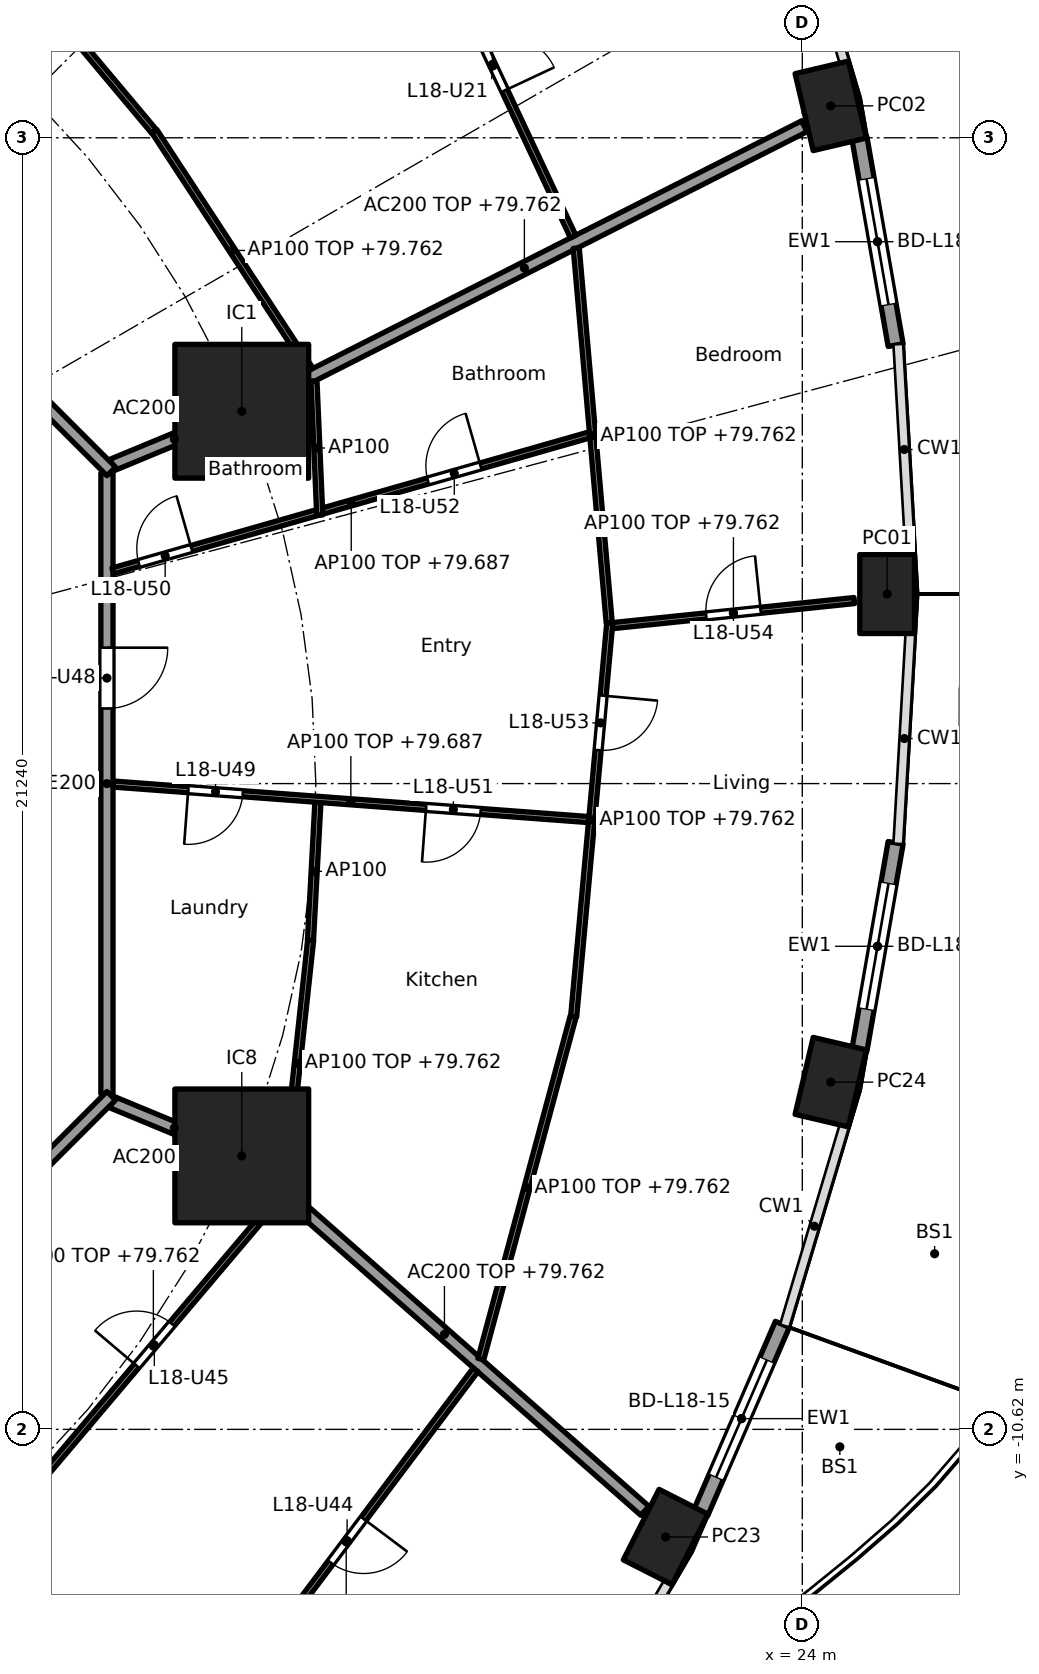
"""IFC4 building model, lengths in metres.
Left out: names, types, materials, properties, quantities, classifications, styles, units other than length and angle.
Written with IfcOpenShell. Run it as: python <this file> out.ifc"""

import sys

from ifc_helpers import new_model, si_unit, direction, frame, frame_2d, origin, origin_2d, place, context, subcontext, project, spatial, rectangle, hollow_rectangle, extrude, element, fill, save


model = new_model("IFC4")
c1 = context("Model", 3, precision=1e-05, world=origin(), true_north=direction((0.0, 1.0)))
c2 = subcontext(c1, "Body", "Model", "MODEL_VIEW")
j1 = project(units=[si_unit("LENGTHUNIT", "METRE"), si_unit("PLANEANGLEUNIT", "RADIAN")], contexts=[c1])
p1 = place(None, origin())
s1 = spatial("IfcSite", under=j1, at=p1, CompositionType="ELEMENT")
p2 = place(p1, origin())
s2 = spatial("IfcBuilding", under=s1, at=p2, CompositionType="ELEMENT")
p3 = place(p2, frame((0.0, 0.0, 77.0)))
s3 = spatial("IfcBuildingStorey", under=s2, at=p3, CompositionType="ELEMENT", Elevation=77.0)
for number, where, z_axis, x_axis in (
    (1, (25.395, 3.118, 0.0), (0.0, 0.0, 1.0), (0.0, 1.0, 0.0)),
    (2, (24.468, 11.145, 0.0), (0.0, 0.0, 1.0), (-0.229, 0.973, 0.0)),
    (3, (21.751, -12.39, 0.0), (0.0, 0.0, 1.0), (0.452, 0.892, 0.0)),
    (4, (24.468, -4.91, 0.0), (0.0, 0.0, 1.0), (0.229, 0.973, 0.0)),
):
    element("IfcColumn", number, at=place(p3, frame(where, z_axis=z_axis, x_axis=x_axis)), inside=s3, PredefinedType="COLUMN", context=c2, shape_type="SweptSolid", body=[
        extrude(hollow_rectangle(XDim=1.3, YDim=0.9, WallThickness=0.045, at=origin_2d()), origin(), (0.0, 0.0, 1.0), 3.7),
    ])
for number, where, z_axis, x_axis in (
    (5, (14.782, 6.123, 0.0), (0.0, 0.0, 1.0), (1.0, 0.0, 0.0)),
    (6, (14.782, -6.123, 0.0), (0.0, 0.0, 1.0), (1.0, 0.0, 0.0)),
):
    element("IfcColumn", number, at=place(p3, frame(where, z_axis=z_axis, x_axis=x_axis)), inside=s3, PredefinedType="COLUMN", context=c2, shape_type="SweptSolid", body=[
        extrude(rectangle(XDim=2.2, YDim=2.2, at=origin_2d()), origin(), (0.0, 0.0, 1.0), 3.7),
    ])
p4 = place(p3, frame((24.94, 10.613, 0.0), z_axis=(0.0, 0.0, 1.0), x_axis=(0.172164316671, -0.985068245385, 0.0)))
e7 = element("IfcWall", 7, at=p4, inside=s3, PredefinedType="SOLIDWALL", context=c2, shape_type="SweptSolid", body=[
    extrude(rectangle(XDim=3.454, YDim=0.25, at=frame_2d((1.727, 0.0))), origin(), (0.0, 0.0, 1.0), 3.44),
])
p5 = place(p4, frame((0.677, 0.0, 0.0)))
e8 = element("IfcOpeningElement", 8, at=p5, cuts=e7, PredefinedType="OPENING", context=c2, shape_type="SweptSolid", body=[
    extrude(rectangle(XDim=2.1, YDim=2.4, at=frame_2d((1.05, 1.2))), frame((0.0, 0.135, 0.0), z_axis=(0.0, -1.0, 0.0), x_axis=(1.0, 0.0, 0.0)), (0.0, 0.0, 1.0), 0.27),
])
p6 = place(p3, frame((23.672, -8.893, 0.0), z_axis=(0.0, 0.0, 1.0), x_axis=(-0.397621629246, -0.917549475481, 0.0)))
e9 = element("IfcWall", 9, at=p6, inside=s3, PredefinedType="SOLIDWALL", context=c2, shape_type="SweptSolid", body=[
    extrude(rectangle(XDim=3.379, YDim=0.25, at=frame_2d((1.69, 0.0))), origin(), (0.0, 0.0, 1.0), 3.44),
])
p7 = place(p6, frame((0.64, 0.0, 0.0)))
e10 = element("IfcOpeningElement", 10, at=p7, cuts=e9, PredefinedType="OPENING", context=c2, shape_type="SweptSolid", body=[
    extrude(rectangle(XDim=2.1, YDim=2.4, at=frame_2d((1.05, 1.2))), frame((0.0, 0.135, 0.0), z_axis=(0.0, -1.0, 0.0), x_axis=(1.0, 0.0, 0.0)), (0.0, 0.0, 1.0), 0.27),
])
p8 = place(p3, frame((25.535, -0.974, 0.0), z_axis=(0.0, 0.0, 1.0), x_axis=(-0.172164316671, -0.985068245385, 0.0)))
e11 = element("IfcWall", 11, at=p8, inside=s3, PredefinedType="SOLIDWALL", context=c2, shape_type="SweptSolid", body=[
    extrude(rectangle(XDim=3.454, YDim=0.25, at=frame_2d((1.727, 0.0))), origin(), (0.0, 0.0, 1.0), 3.44),
])
p9 = place(p8, frame((0.677, 0.0, 0.0)))
e12 = element("IfcOpeningElement", 12, at=p9, cuts=e11, PredefinedType="OPENING", context=c2, shape_type="SweptSolid", body=[
    extrude(rectangle(XDim=2.1, YDim=2.4, at=frame_2d((1.05, 1.2))), frame((0.0, 0.135, 0.0), z_axis=(0.0, -1.0, 0.0), x_axis=(1.0, 0.0, 0.0)), (0.0, 0.0, 1.0), 0.27),
])
p10 = place(p3, frame((12.657, 5.243, 0.0), z_axis=(0.0, 0.0, 1.0), x_axis=(0.923876145736, 0.382691608661, 0.0)))
e13 = element("IfcWall", 13, at=p10, inside=s3, PredefinedType="PARTITIONING", context=c2, shape_type="SweptSolid", body=[
    extrude(rectangle(XDim=2.2, YDim=0.2, at=frame_2d((1.1, 0.0))), origin(), (0.0, 0.0, 1.0), 3.44),
])
p11 = place(p3, frame((14.827, 6.146, 0.0), z_axis=(0.0, 0.0, 1.0), x_axis=(0.892068075337, 0.451901038906, 0.0)))
e14 = element("IfcWall", 14, at=p11, inside=s3, PredefinedType="PARTITIONING", context=c2, shape_type="SweptSolid", body=[
    extrude(rectangle(XDim=10.32, YDim=0.2, at=frame_2d((5.16, 0.0))), origin(), (0.0, 0.0, 1.0), 2.762),
])
p12 = place(p3, frame((12.657, -5.243, 0.0), z_axis=(0.0, 0.0, 1.0), x_axis=(0.923876145736, -0.382691608661, 0.0)))
e15 = element("IfcWall", 15, at=p12, inside=s3, PredefinedType="PARTITIONING", context=c2, shape_type="SweptSolid", body=[
    extrude(rectangle(XDim=2.2, YDim=0.2, at=frame_2d((1.1, 0.0))), origin(), (0.0, 0.0, 1.0), 3.44),
])
p13 = place(p3, frame((14.82, -6.156, 0.0), z_axis=(0.0, 0.0, 1.0), x_axis=(0.750582231659, -0.660777052808, 0.0)))
e16 = element("IfcWall", 16, at=p13, inside=s3, PredefinedType="PARTITIONING", context=c2, shape_type="SweptSolid", body=[
    extrude(rectangle(XDim=8.781, YDim=0.2, at=frame_2d((4.391, 0.0))), origin(), (0.0, 0.0, 1.0), 2.762),
])
p14 = place(p3, frame((12.565, -5.104, 0.0), z_axis=(0.0, 0.0, 1.0), x_axis=(0.0, 1.0, 0.0)))
e17 = element("IfcWall", 17, at=p14, inside=s3, PredefinedType="PARTITIONING", context=c2, shape_type="SweptSolid", body=[
    extrude(rectangle(XDim=10.209, YDim=0.2, at=frame_2d((5.104, 0.0))), origin(), (0.0, 0.0, 1.0), 3.44),
])
p15 = place(p14, frame((6.339, 0.0, 0.0)))
e18 = element("IfcOpeningElement", 18, at=p15, cuts=e17, PredefinedType="OPENING", context=c2, shape_type="SweptSolid", body=[
    extrude(rectangle(XDim=1.0, YDim=2.1, at=frame_2d((0.5, 1.05))), frame((0.0, 0.11, 0.0), z_axis=(0.0, -1.0, 0.0), x_axis=(1.0, 0.0, 0.0)), (0.0, 0.0, 1.0), 0.22),
])
p16 = place(p3, frame((12.635, 5.134, 0.0), z_axis=(0.0, 0.0, 1.0), x_axis=(-0.707106781187, 0.707106781187, 0.0)))
e19 = element("IfcWall", 19, at=p16, inside=s3, PredefinedType="PARTITIONING", context=c2, shape_type="SweptSolid", body=[
    extrude(rectangle(XDim=10.609, YDim=0.2, at=frame_2d((5.305, 0.0))), origin(), (0.0, 0.0, 1.0), 3.44),
])
p17 = place(p3, frame((5.275, -12.494, 0.0), z_axis=(0.0, 0.0, 1.0), x_axis=(0.707106781187, 0.707106781187, 0.0)))
e20 = element("IfcWall", 20, at=p17, inside=s3, PredefinedType="PARTITIONING", context=c2, shape_type="SweptSolid", body=[
    extrude(rectangle(XDim=10.409, YDim=0.2, at=frame_2d((5.205, 0.0))), origin(), (0.0, 0.0, 1.0), 3.44),
])
p18 = place(p3, frame((20.879, 2.597, 0.0), z_axis=(0.0, 0.0, 1.0), x_axis=(0.994666546694, 0.103142914868, 0.0)))
e21 = element("IfcWall", 21, at=p18, inside=s3, PredefinedType="PARTITIONING", context=c2, shape_type="SweptSolid", body=[
    extrude(rectangle(XDim=3.998, YDim=0.1, at=frame_2d((1.999, 0.0))), origin(), (0.0, 0.0, 1.0), 2.762),
])
p19 = place(p18, frame((1.549, 0.0, 0.0)))
e22 = element("IfcOpeningElement", 22, at=p19, cuts=e21, PredefinedType="OPENING", context=c2, shape_type="SweptSolid", body=[
    extrude(rectangle(XDim=0.9, YDim=2.1, at=frame_2d((0.45, 1.05))), frame((0.0, 0.06, 0.0), z_axis=(0.0, -1.0, 0.0), x_axis=(1.0, 0.0, 0.0)), (0.0, 0.0, 1.0), 0.12),
])
p20 = place(p3, frame((20.825, 2.642, 0.0), z_axis=(0.0, 0.0, 1.0), x_axis=(-0.087760219522, 0.996141628419, 0.0)))
e23 = element("IfcWall", 23, at=p20, inside=s3, PredefinedType="PARTITIONING", context=c2, shape_type="SweptSolid", body=[
    extrude(rectangle(XDim=6.187, YDim=0.1, at=frame_2d((3.094, 0.0))), origin(), (0.0, 0.0, 1.0), 2.762),
])
p21 = place(p3, frame((20.834, 2.642, 0.0), z_axis=(0.0, 0.0, 1.0), x_axis=(-0.091385407685, -0.995815599025, 0.0)))
e24 = element("IfcWall", 24, at=p21, inside=s3, PredefinedType="PARTITIONING", context=c2, shape_type="SweptSolid", body=[
    extrude(rectangle(XDim=6.502, YDim=0.1, at=frame_2d((3.251, 0.0))), origin(), (0.0, 0.0, 1.0), 2.762),
])
p22 = place(p21, frame((1.201, 0.0, 0.0)))
e25 = element("IfcOpeningElement", 25, at=p22, cuts=e24, PredefinedType="OPENING", context=c2, shape_type="SweptSolid", body=[
    extrude(rectangle(XDim=0.9, YDim=2.1, at=frame_2d((0.45, 1.05))), frame((0.0, 0.06, 0.0), z_axis=(0.0, -1.0, 0.0), x_axis=(1.0, 0.0, 0.0)), (0.0, 0.0, 1.0), 0.12),
])
p23 = place(p3, frame((12.661, 3.497, 0.0), z_axis=(0.0, 0.0, 1.0), x_axis=(0.961626678623, 0.274361314621, 0.0)))
e26 = element("IfcWall", 26, at=p23, inside=s3, PredefinedType="PARTITIONING", context=c2, shape_type="SweptSolid", body=[
    extrude(rectangle(XDim=8.156, YDim=0.1, at=frame_2d((4.078, 0.0))), origin(), (0.0, 0.0, 1.0), 2.687),
])
p24 = place(p23, frame((0.446, 0.0, 0.0)))
e27 = element("IfcOpeningElement", 27, at=p24, cuts=e26, PredefinedType="OPENING", context=c2, shape_type="SweptSolid", body=[
    extrude(rectangle(XDim=0.9, YDim=2.1, at=frame_2d((0.45, 1.05))), frame((0.0, 0.06, 0.0), z_axis=(0.0, -1.0, 0.0), x_axis=(1.0, 0.0, 0.0)), (0.0, 0.0, 1.0), 0.12),
])
p25 = place(p23, frame((5.39, 0.0, 0.0)))
e28 = element("IfcOpeningElement", 28, at=p25, cuts=e26, PredefinedType="OPENING", context=c2, shape_type="SweptSolid", body=[
    extrude(rectangle(XDim=0.9, YDim=2.1, at=frame_2d((0.45, 1.05))), frame((0.0, 0.06, 0.0), z_axis=(0.0, -1.0, 0.0), x_axis=(1.0, 0.0, 0.0)), (0.0, 0.0, 1.0), 0.12),
])
p26 = place(p3, frame((16.064, 4.415, 0.0), z_axis=(0.0, 0.0, 1.0), x_axis=(-0.043101501373, 0.999070698489, 0.0)))
e29 = element("IfcWall", 29, at=p26, inside=s3, PredefinedType="PARTITIONING", context=c2, shape_type="SweptSolid", body=[
    extrude(rectangle(XDim=2.209, YDim=0.1, at=frame_2d((1.104, 0.0))), origin(), (0.0, 0.0, 1.0), 3.44),
])
p27 = place(p3, frame((15.91, 6.806, 0.0), z_axis=(0.0, 0.0, 1.0), x_axis=(-0.547468243486, 0.836826458936, 0.0)))
e30 = element("IfcWall", 30, at=p27, inside=s3, PredefinedType="PARTITIONING", context=c2, shape_type="SweptSolid", body=[
    extrude(rectangle(XDim=4.688, YDim=0.1, at=frame_2d((2.344, 0.0))), origin(), (0.0, 0.0, 1.0), 2.762),
])
p28 = place(p3, frame((20.231, 8.995, 0.0), z_axis=(0.0, 0.0, 1.0), x_axis=(-0.424587886407, 0.905386727712, 0.0)))
e31 = element("IfcWall", 31, at=p28, inside=s3, PredefinedType="PARTITIONING", context=c2, shape_type="SweptSolid", body=[
    extrude(rectangle(XDim=6.254, YDim=0.1, at=frame_2d((3.127, 0.0))), origin(), (0.0, 0.0, 1.0), 2.762),
])
p29 = place(p28, frame((2.652, 0.0, 0.0)))
e32 = element("IfcOpeningElement", 32, at=p29, cuts=e31, PredefinedType="OPENING", context=c2, shape_type="SweptSolid", body=[
    extrude(rectangle(XDim=0.9, YDim=2.1, at=frame_2d((0.45, 1.05))), frame((0.0, 0.06, 0.0), z_axis=(0.0, -1.0, 0.0), x_axis=(1.0, 0.0, 0.0)), (0.0, 0.0, 1.0), 0.12),
])
p30 = place(p3, frame((13.339, 10.725, 0.0), z_axis=(0.0, 0.0, 1.0), x_axis=(-0.642515455924, 0.766272724882, 0.0)))
e33 = element("IfcWall", 33, at=p30, inside=s3, PredefinedType="PARTITIONING", context=c2, shape_type="SweptSolid", body=[
    extrude(rectangle(XDim=4.537, YDim=0.1, at=frame_2d((2.269, 0.0))), origin(), (0.0, 0.0, 1.0), 2.762),
])
p31 = place(p3, frame((7.713, 10.195, 0.0), z_axis=(0.0, 0.0, 1.0), x_axis=(0.552111071171, 0.833770571015, 0.0)))
e34 = element("IfcWall", 34, at=p31, inside=s3, PredefinedType="PARTITIONING", context=c2, shape_type="SweptSolid", body=[
    extrude(rectangle(XDim=17.208, YDim=0.1, at=frame_2d((8.604, 0.0))), origin(), (0.0, 0.0, 1.0), 2.687),
])
p32 = place(p31, frame((1.976, 0.0, 0.0)))
e35 = element("IfcOpeningElement", 35, at=p32, cuts=e34, PredefinedType="OPENING", context=c2, shape_type="SweptSolid", body=[
    extrude(rectangle(XDim=0.9, YDim=2.1, at=frame_2d((0.45, 1.05))), frame((0.0, 0.06, 0.0), z_axis=(0.0, -1.0, 0.0), x_axis=(1.0, 0.0, 0.0)), (0.0, 0.0, 1.0), 0.12),
])
p33 = place(p31, frame((7.611, 0.0, 0.0)))
e36 = element("IfcOpeningElement", 36, at=p33, cuts=e34, PredefinedType="OPENING", context=c2, shape_type="SweptSolid", body=[
    extrude(rectangle(XDim=0.9, YDim=2.1, at=frame_2d((0.45, 1.05))), frame((0.0, 0.06, 0.0), z_axis=(0.0, -1.0, 0.0), x_axis=(1.0, 0.0, 0.0)), (0.0, 0.0, 1.0), 0.12),
])
p34 = place(p3, frame((11.255, -11.699, 0.0), z_axis=(0.0, 0.0, 1.0), x_axis=(0.646107653745, 0.763246290375, 0.0)))
e37 = element("IfcWall", 37, at=p34, inside=s3, PredefinedType="PARTITIONING", context=c2, shape_type="SweptSolid", body=[
    extrude(rectangle(XDim=6.417, YDim=0.1, at=frame_2d((3.208, 0.0))), origin(), (0.0, 0.0, 1.0), 2.762),
])
p35 = place(p34, frame((2.784, 0.0, 0.0)))
e38 = element("IfcOpeningElement", 38, at=p35, cuts=e37, PredefinedType="OPENING", context=c2, shape_type="SweptSolid", body=[
    extrude(rectangle(XDim=0.9, YDim=2.1, at=frame_2d((0.45, 1.05))), frame((0.0, 0.06, 0.0), z_axis=(0.0, -1.0, 0.0), x_axis=(1.0, 0.0, 0.0)), (0.0, 0.0, 1.0), 0.12),
])
p36 = place(p3, frame((14.372, -15.3, 0.0), z_axis=(0.0, 0.0, 1.0), x_axis=(0.600987107857, 0.79925871668, 0.0)))
e39 = element("IfcWall", 39, at=p36, inside=s3, PredefinedType="PARTITIONING", context=c2, shape_type="SweptSolid", body=[
    extrude(rectangle(XDim=7.08, YDim=0.1, at=frame_2d((3.54, 0.0))), origin(), (0.0, 0.0, 1.0), 2.762),
])
p37 = place(p36, frame((3.115, 0.0, 0.0)))
e40 = element("IfcOpeningElement", 40, at=p37, cuts=e39, PredefinedType="OPENING", context=c2, shape_type="SweptSolid", body=[
    extrude(rectangle(XDim=0.9, YDim=2.1, at=frame_2d((0.45, 1.05))), frame((0.0, 0.06, 0.0), z_axis=(0.0, -1.0, 0.0), x_axis=(1.0, 0.0, 0.0)), (0.0, 0.0, 1.0), 0.12),
])
p38 = place(p3, frame((15.477, -6.625, 0.0), z_axis=(0.0, 0.0, 1.0), x_axis=(0.107561928907, 0.994198386365, 0.0)))
e41 = element("IfcWall", 41, at=p38, inside=s3, PredefinedType="PARTITIONING", context=c2, shape_type="SweptSolid", body=[
    extrude(rectangle(XDim=4.072, YDim=0.1, at=frame_2d((2.036, 0.0))), origin(), (0.0, 0.0, 1.0), 2.762),
])
p39 = place(p3, frame((18.713, -9.464, 0.0), z_axis=(0.0, 0.0, 1.0), x_axis=(0.260279646259, 0.965533275316, 0.0)))
e42 = element("IfcWall", 42, at=p39, inside=s3, PredefinedType="PARTITIONING", context=c2, shape_type="SweptSolid", body=[
    extrude(rectangle(XDim=5.833, YDim=0.1, at=frame_2d((2.917, 0.0))), origin(), (0.0, 0.0, 1.0), 2.762),
])
p40 = place(p3, frame((15.912, -2.577, 0.0), z_axis=(0.0, 0.0, 1.0), x_axis=(0.053749298185, 0.998554461682, 0.0)))
e43 = element("IfcWall", 43, at=p40, inside=s3, PredefinedType="PARTITIONING", context=c2, shape_type="SweptSolid", body=[
    extrude(rectangle(XDim=2.271, YDim=0.1, at=frame_2d((1.135, 0.0))), origin(), (0.0, 0.0, 1.0), 3.44),
])
p41 = place(p3, frame((12.665, -0.008, 0.0), z_axis=(0.0, 0.0, 1.0), x_axis=(0.997222647159, -0.074478130978, 0.0)))
e44 = element("IfcWall", 44, at=p41, inside=s3, PredefinedType="PARTITIONING", context=c2, shape_type="SweptSolid", body=[
    extrude(rectangle(XDim=7.844, YDim=0.1, at=frame_2d((3.922, 0.0))), origin(), (0.0, 0.0, 1.0), 2.687),
])
p42 = place(p41, frame((1.241, 0.0, 0.0)))
e45 = element("IfcOpeningElement", 45, at=p42, cuts=e44, PredefinedType="OPENING", context=c2, shape_type="SweptSolid", body=[
    extrude(rectangle(XDim=0.9, YDim=2.1, at=frame_2d((0.45, 1.05))), frame((0.0, 0.06, 0.0), z_axis=(0.0, -1.0, 0.0), x_axis=(1.0, 0.0, 0.0)), (0.0, 0.0, 1.0), 0.12),
])
p43 = place(p41, frame((5.163, 0.0, 0.0)))
e46 = element("IfcOpeningElement", 46, at=p43, cuts=e44, PredefinedType="OPENING", context=c2, shape_type="SweptSolid", body=[
    extrude(rectangle(XDim=0.9, YDim=2.1, at=frame_2d((0.45, 1.05))), frame((0.0, 0.06, 0.0), z_axis=(0.0, -1.0, 0.0), x_axis=(1.0, 0.0, 0.0)), (0.0, 0.0, 1.0), 0.12),
])
p44 = place(p5, origin())
e47 = element("IfcDoor", 47, at=p44, inside=s3, OperationType="SLIDING_TO_LEFT", PredefinedType="DOOR", context=c2, shape_type="SweptSolid", body=[
    extrude(rectangle(XDim=2.1, YDim=2.4, at=frame_2d((1.05, 1.2))), frame((0.0, 0.025, 0.0), z_axis=(0.0, -1.0, 0.0), x_axis=(1.0, 0.0, 0.0)), (0.0, 0.0, 1.0), 0.05),
])
fill(e8, e47)
p45 = place(p7, origin())
e48 = element("IfcDoor", 48, at=p45, inside=s3, OperationType="SLIDING_TO_LEFT", PredefinedType="DOOR", context=c2, shape_type="SweptSolid", body=[
    extrude(rectangle(XDim=2.1, YDim=2.4, at=frame_2d((1.05, 1.2))), frame((0.0, 0.025, 0.0), z_axis=(0.0, -1.0, 0.0), x_axis=(1.0, 0.0, 0.0)), (0.0, 0.0, 1.0), 0.05),
])
fill(e10, e48)
p46 = place(p9, origin())
e49 = element("IfcDoor", 49, at=p46, inside=s3, OperationType="SLIDING_TO_LEFT", PredefinedType="DOOR", context=c2, shape_type="SweptSolid", body=[
    extrude(rectangle(XDim=2.1, YDim=2.4, at=frame_2d((1.05, 1.2))), frame((0.0, 0.025, 0.0), z_axis=(0.0, -1.0, 0.0), x_axis=(1.0, 0.0, 0.0)), (0.0, 0.0, 1.0), 0.05),
])
fill(e12, e49)
p47 = place(p29, frame((0.9, 0.0, 0.0), x_axis=(-1.0, 0.0, 0.0)))
e50 = element("IfcDoor", 50, at=p47, inside=s3, OperationType="SINGLE_SWING_RIGHT", PredefinedType="DOOR", context=c2, shape_type="SweptSolid", body=[
    extrude(rectangle(XDim=0.9, YDim=2.1, at=frame_2d((0.45, 1.05))), frame((0.0, 0.025, 0.0), z_axis=(0.0, -1.0, 0.0), x_axis=(1.0, 0.0, 0.0)), (0.0, 0.0, 1.0), 0.05),
])
fill(e32, e50)
p48 = place(p37, frame((0.9, 0.0, 0.0), x_axis=(-1.0, 0.0, 0.0)))
e51 = element("IfcDoor", 51, at=p48, inside=s3, OperationType="SINGLE_SWING_LEFT", PredefinedType="DOOR", context=c2, shape_type="SweptSolid", body=[
    extrude(rectangle(XDim=0.9, YDim=2.1, at=frame_2d((0.45, 1.05))), frame((0.0, 0.025, 0.0), z_axis=(0.0, -1.0, 0.0), x_axis=(1.0, 0.0, 0.0)), (0.0, 0.0, 1.0), 0.05),
])
fill(e40, e51)
p49 = place(p35, origin())
e52 = element("IfcDoor", 52, at=p49, inside=s3, OperationType="SINGLE_SWING_LEFT", PredefinedType="DOOR", context=c2, shape_type="SweptSolid", body=[
    extrude(rectangle(XDim=0.9, YDim=2.1, at=frame_2d((0.45, 1.05))), frame((0.0, 0.025, 0.0), z_axis=(0.0, -1.0, 0.0), x_axis=(1.0, 0.0, 0.0)), (0.0, 0.0, 1.0), 0.05),
])
fill(e38, e52)
p50 = place(p15, frame((1.0, 0.0, 0.0), x_axis=(-1.0, 0.0, 0.0)))
e53 = element("IfcDoor", 53, at=p50, inside=s3, OperationType="SINGLE_SWING_LEFT", PredefinedType="DOOR", context=c2, shape_type="SweptSolid", body=[
    extrude(rectangle(XDim=1.0, YDim=2.1, at=frame_2d((0.5, 1.05))), frame((0.0, 0.025, 0.0), z_axis=(0.0, -1.0, 0.0), x_axis=(1.0, 0.0, 0.0)), (0.0, 0.0, 1.0), 0.05),
])
fill(e18, e53)
p51 = place(p42, frame((0.9, 0.0, 0.0), x_axis=(-1.0, 0.0, 0.0)))
e54 = element("IfcDoor", 54, at=p51, inside=s3, OperationType="SINGLE_SWING_RIGHT", PredefinedType="DOOR", context=c2, shape_type="SweptSolid", body=[
    extrude(rectangle(XDim=0.9, YDim=2.1, at=frame_2d((0.45, 1.05))), frame((0.0, 0.025, 0.0), z_axis=(0.0, -1.0, 0.0), x_axis=(1.0, 0.0, 0.0)), (0.0, 0.0, 1.0), 0.05),
])
fill(e45, e54)
p52 = place(p24, origin())
e55 = element("IfcDoor", 55, at=p52, inside=s3, OperationType="SINGLE_SWING_RIGHT", PredefinedType="DOOR", context=c2, shape_type="SweptSolid", body=[
    extrude(rectangle(XDim=0.9, YDim=2.1, at=frame_2d((0.45, 1.05))), frame((0.0, 0.025, 0.0), z_axis=(0.0, -1.0, 0.0), x_axis=(1.0, 0.0, 0.0)), (0.0, 0.0, 1.0), 0.05),
])
fill(e27, e55)
p53 = place(p43, frame((0.9, 0.0, 0.0), x_axis=(-1.0, 0.0, 0.0)))
e56 = element("IfcDoor", 56, at=p53, inside=s3, OperationType="SINGLE_SWING_RIGHT", PredefinedType="DOOR", context=c2, shape_type="SweptSolid", body=[
    extrude(rectangle(XDim=0.9, YDim=2.1, at=frame_2d((0.45, 1.05))), frame((0.0, 0.025, 0.0), z_axis=(0.0, -1.0, 0.0), x_axis=(1.0, 0.0, 0.0)), (0.0, 0.0, 1.0), 0.05),
])
fill(e46, e56)
p54 = place(p25, origin())
e57 = element("IfcDoor", 57, at=p54, inside=s3, OperationType="SINGLE_SWING_RIGHT", PredefinedType="DOOR", context=c2, shape_type="SweptSolid", body=[
    extrude(rectangle(XDim=0.9, YDim=2.1, at=frame_2d((0.45, 1.05))), frame((0.0, 0.025, 0.0), z_axis=(0.0, -1.0, 0.0), x_axis=(1.0, 0.0, 0.0)), (0.0, 0.0, 1.0), 0.05),
])
fill(e28, e57)
p55 = place(p22, origin())
e58 = element("IfcDoor", 58, at=p55, inside=s3, OperationType="SINGLE_SWING_LEFT", PredefinedType="DOOR", context=c2, shape_type="SweptSolid", body=[
    extrude(rectangle(XDim=0.9, YDim=2.1, at=frame_2d((0.45, 1.05))), frame((0.0, 0.025, 0.0), z_axis=(0.0, -1.0, 0.0), x_axis=(1.0, 0.0, 0.0)), (0.0, 0.0, 1.0), 0.05),
])
fill(e25, e58)
p56 = place(p19, origin())
e59 = element("IfcDoor", 59, at=p56, inside=s3, OperationType="SINGLE_SWING_RIGHT", PredefinedType="DOOR", context=c2, shape_type="SweptSolid", body=[
    extrude(rectangle(XDim=0.9, YDim=2.1, at=frame_2d((0.45, 1.05))), frame((0.0, 0.025, 0.0), z_axis=(0.0, -1.0, 0.0), x_axis=(1.0, 0.0, 0.0)), (0.0, 0.0, 1.0), 0.05),
])
fill(e22, e59)
save(model, sys.argv[1])
